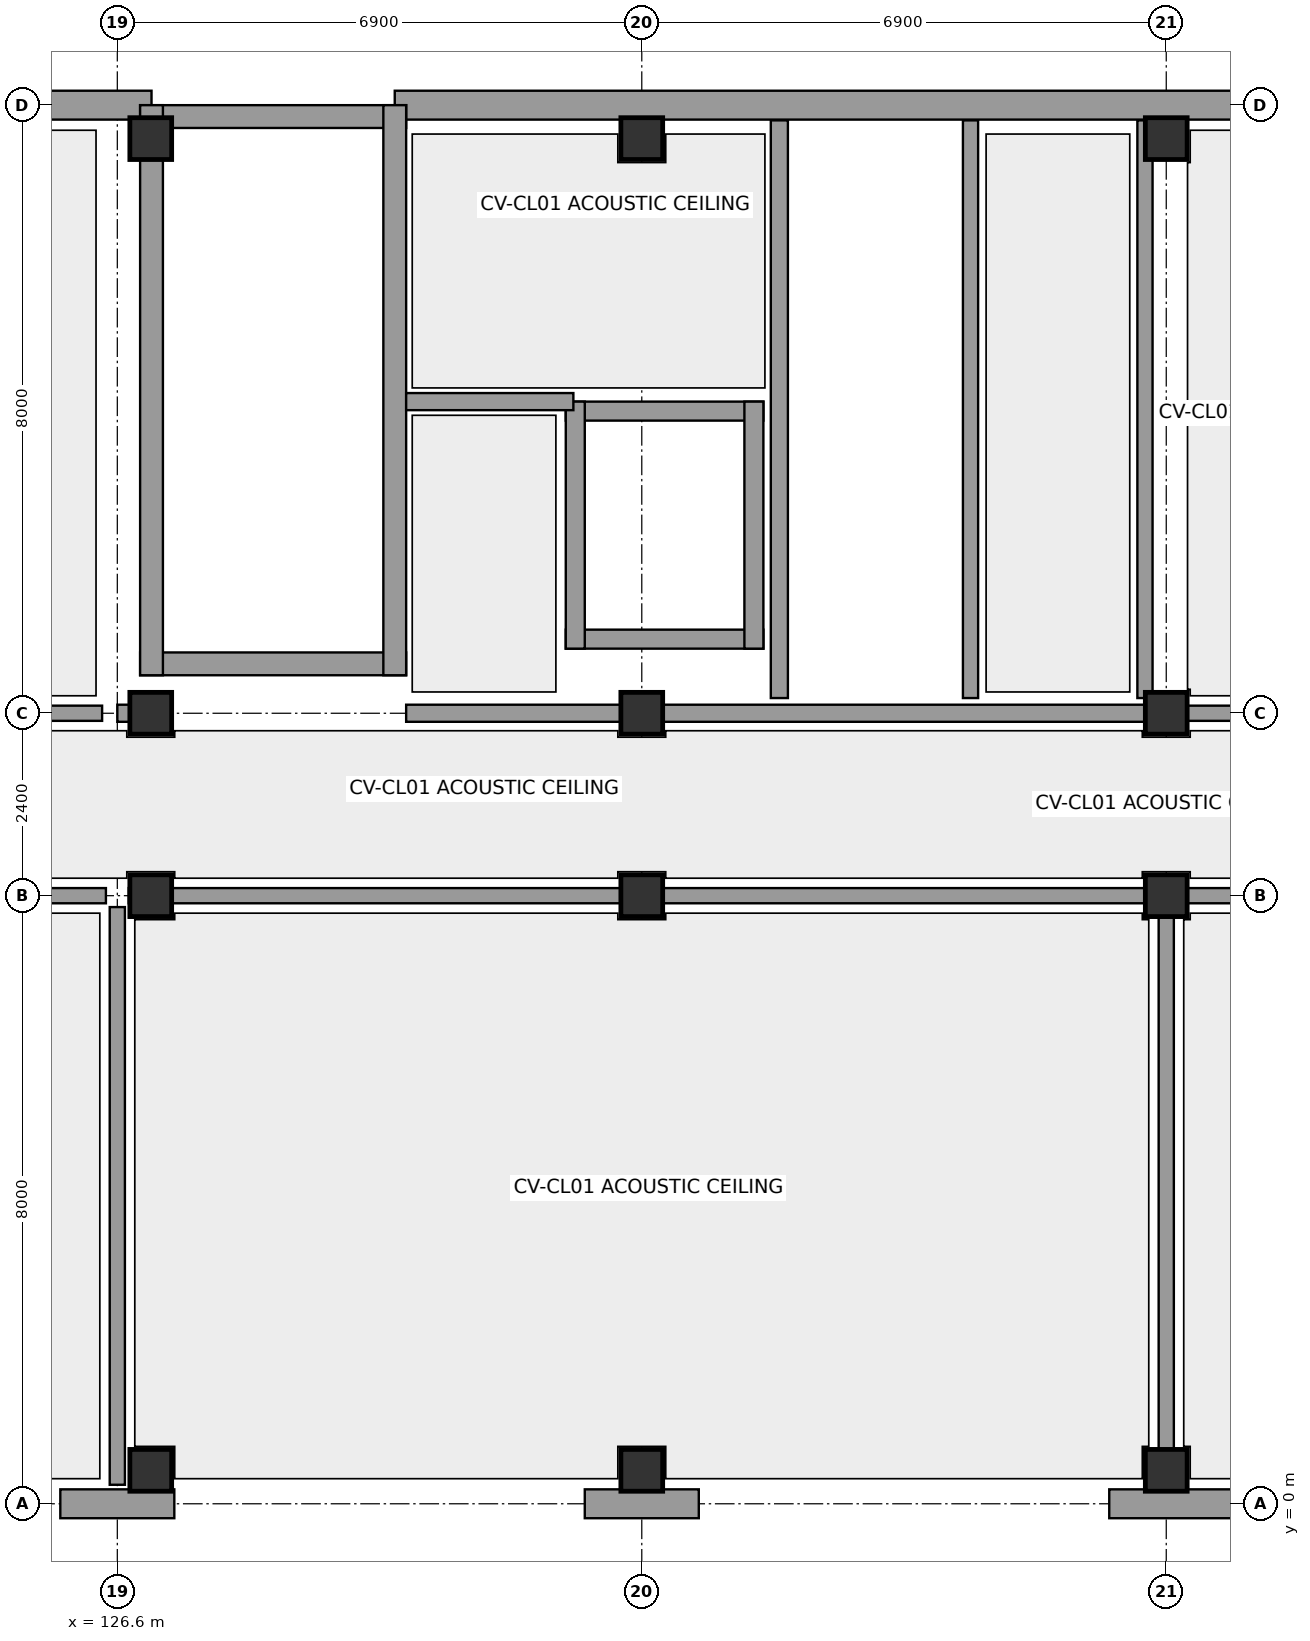
"""IFC4 building model, lengths in metres.
Left out: names, types, materials, properties, quantities, classifications, styles, units other than length and angle.
Written with IfcOpenShell. Run it as: python <this file> out.ifc"""

import sys

from ifc_helpers import new_model, si_unit, direction, frame, frame_2d, origin, origin_with_axes, origin_2d, place, context, subcontext, project, spatial, rectangle, extrude, element, fill, save


model = new_model("IFC4")
c1 = context("Model", 3, precision=1e-05, world=origin(), true_north=direction((0.0, 1.0)))
c2 = subcontext(c1, "Body", "Model", "MODEL_VIEW")
j1 = project(units=[si_unit("LENGTHUNIT", "METRE"), si_unit("PLANEANGLEUNIT", "RADIAN")], contexts=[c1])
p1 = place(None, origin())
s1 = spatial("IfcSite", under=j1, at=p1, CompositionType="ELEMENT")
p2 = place(p1, origin())
s2 = spatial("IfcBuilding", under=s1, at=p2, CompositionType="ELEMENT")
p3 = place(p2, origin())
s3 = spatial("IfcBuildingStorey", under=s2, at=p3, CompositionType="ELEMENT", Elevation=0.0)
for number, where, z_axis, x_axis in (
    (1, (127.04, 0.44, 0.0), (0.0, 0.0, 1.0), (1.0, 0.0, 0.0)),
    (2, (127.04, 8.0, 0.0), (0.0, 0.0, 1.0), (1.0, 0.0, 0.0)),
    (3, (127.04, 10.4, 0.0), (0.0, 0.0, 1.0), (1.0, 0.0, 0.0)),
    (4, (127.04, 17.96, 0.0), (0.0, 0.0, 1.0), (1.0, 0.0, 0.0)),
    (5, (133.5, 0.44, 0.0), (0.0, 0.0, 1.0), (1.0, 0.0, 0.0)),
    (6, (133.5, 8.0, 0.0), (0.0, 0.0, 1.0), (1.0, 0.0, 0.0)),
    (7, (133.5, 10.4, 0.0), (0.0, 0.0, 1.0), (1.0, 0.0, 0.0)),
    (8, (133.5, 17.96, 0.0), (0.0, 0.0, 1.0), (1.0, 0.0, 0.0)),
    (9, (140.4, 0.44, 0.0), (0.0, 0.0, 1.0), (1.0, 0.0, 0.0)),
    (10, (140.4, 8.0, 0.0), (0.0, 0.0, 1.0), (1.0, 0.0, 0.0)),
    (11, (140.4, 10.4, 0.0), (0.0, 0.0, 1.0), (1.0, 0.0, 0.0)),
    (12, (140.4, 17.96, 0.0), (0.0, 0.0, 1.0), (1.0, 0.0, 0.0)),
):
    element("IfcColumn", number, at=place(p3, frame(where, z_axis=z_axis, x_axis=x_axis)), inside=s3, PredefinedType="COLUMN", context=c2, shape_type="SweptSolid", body=[
        extrude(rectangle(XDim=0.55, YDim=0.55, at=origin_2d()), origin(), (0.0, 0.0, 1.0), 4.4),
    ])
for number, where, z_axis, x_axis in (
    (13, (125.85, 0.0, 0.0), (0.0, 0.0, 1.0), (1.0, 0.0, 0.0)),
    (14, (132.75, 0.0, 0.0), (0.0, 0.0, 1.0), (1.0, 0.0, 0.0)),
):
    element("IfcWall", number, at=place(p3, frame(where, z_axis=z_axis, x_axis=x_axis)), inside=s3, PredefinedType="STANDARD", context=c2, shape_type="SweptSolid", body=[
        extrude(rectangle(XDim=1.5, YDim=0.38, at=frame_2d((0.75, 0.0))), origin(), (0.0, 0.0, 1.0), 4.12),
    ])
p4 = place(p3, frame((139.65, 0.0, 0.0), z_axis=(0.0, 0.0, 1.0), x_axis=(1.0, 0.0, 0.0)))
e15 = element("IfcWall", 15, at=p4, inside=s3, PredefinedType="STANDARD", context=c2, shape_type="SweptSolid", body=[
    extrude(rectangle(XDim=4.05, YDim=0.38, at=frame_2d((2.025, 0.0))), origin(), (0.0, 0.0, 1.0), 4.12),
])
p5 = place(p4, frame((1.9, 0.0, 0.0)))
e16 = element("IfcOpeningElement", 16, at=p5, cuts=e15, PredefinedType="OPENING", context=c2, shape_type="SweptSolid", body=[
    extrude(rectangle(XDim=1.8, YDim=2.4, at=frame_2d((0.9, 1.2))), frame((0.0, 0.202, 0.0), z_axis=(0.0, -1.0, 0.0), x_axis=(1.0, 0.0, 0.0)), (0.0, 0.0, 1.0), 0.404),
])
p6 = place(p3, frame((125.65, 18.4, 0.0), z_axis=(0.0, 0.0, 1.0), x_axis=(1.0, 0.0, 0.0)))
e17 = element("IfcWall", 17, at=p6, inside=s3, PredefinedType="STANDARD", context=c2, shape_type="SweptSolid", body=[
    extrude(rectangle(XDim=1.4, YDim=0.38, at=frame_2d((0.7, 0.0))), origin(), (0.0, 0.0, 1.0), 4.12),
])
p7 = place(p3, frame((130.25, 18.4, 0.0), z_axis=(0.0, 0.0, 1.0), x_axis=(1.0, 0.0, 0.0)))
e18 = element("IfcWall", 18, at=p7, inside=s3, PredefinedType="STANDARD", context=c2, shape_type="SweptSolid", body=[
    extrude(rectangle(XDim=11.1, YDim=0.38, at=frame_2d((5.55, 0.0))), origin(), (0.0, 0.0, 1.0), 4.12),
])
p8 = place(p3, frame((126.9, 18.25, 0.0), z_axis=(0.0, 0.0, 1.0), x_axis=(1.0, 0.0, 0.0)))
e19 = element("IfcWall", 19, at=p8, inside=s3, PredefinedType="SHEAR", context=c2, shape_type="SweptSolid", body=[
    extrude(rectangle(XDim=3.5, YDim=0.3, at=frame_2d((1.75, 0.0))), origin(), (0.0, 0.0, 1.0), 4.12),
])
p9 = place(p8, frame((1.05, 0.0, 0.0)))
e20 = element("IfcOpeningElement", 20, at=p9, cuts=e19, PredefinedType="OPENING", context=c2, shape_type="SweptSolid", body=[
    extrude(rectangle(XDim=1.4, YDim=2.25, at=frame_2d((0.7, 1.125))), frame((0.0, 0.162, 0.0), z_axis=(0.0, -1.0, 0.0), x_axis=(1.0, 0.0, 0.0)), (0.0, 0.0, 1.0), 0.324),
])
p10 = place(p3, frame((126.9, 11.05, 0.0), z_axis=(0.0, 0.0, 1.0), x_axis=(1.0, 0.0, 0.0)))
e21 = element("IfcWall", 21, at=p10, inside=s3, PredefinedType="SHEAR", context=c2, shape_type="SweptSolid", body=[
    extrude(rectangle(XDim=3.5, YDim=0.3, at=frame_2d((1.75, 0.0))), origin(), (0.0, 0.0, 1.0), 4.12),
])
p11 = place(p3, frame((127.05, 10.9, 0.0), z_axis=(0.0, 0.0, 1.0), x_axis=(0.0, 1.0, 0.0)))
e22 = element("IfcWall", 22, at=p11, inside=s3, PredefinedType="SHEAR", context=c2, shape_type="SweptSolid", body=[
    extrude(rectangle(XDim=7.5, YDim=0.3, at=frame_2d((3.75, 0.0))), origin(), (0.0, 0.0, 1.0), 4.12),
])
p12 = place(p3, frame((130.25, 10.9, 0.0), z_axis=(0.0, 0.0, 1.0), x_axis=(0.0, 1.0, 0.0)))
e23 = element("IfcWall", 23, at=p12, inside=s3, PredefinedType="SHEAR", context=c2, shape_type="SweptSolid", body=[
    extrude(rectangle(XDim=7.5, YDim=0.3, at=frame_2d((3.75, 0.0))), origin(), (0.0, 0.0, 1.0), 4.12),
])
p13 = place(p12, frame((5.7, 0.0, 0.0)))
e24 = element("IfcOpeningElement", 24, at=p13, cuts=e23, PredefinedType="OPENING", context=c2, shape_type="SweptSolid", body=[
    extrude(rectangle(XDim=1.15, YDim=2.15, at=frame_2d((0.575, 1.075))), frame((0.0, 0.162, 0.0), z_axis=(0.0, -1.0, 0.0), x_axis=(1.0, 0.0, 0.0)), (0.0, 0.0, 1.0), 0.324),
])
p14 = place(p3, frame((132.5, 14.375, 0.0), z_axis=(0.0, 0.0, 1.0), x_axis=(1.0, 0.0, 0.0)))
e25 = element("IfcWall", 25, at=p14, inside=s3, PredefinedType="SHEAR", context=c2, shape_type="SweptSolid", body=[
    extrude(rectangle(XDim=2.6, YDim=0.25, at=frame_2d((1.3, 0.0))), origin(), (0.0, 0.0, 1.0), 4.12),
])
p15 = place(p14, frame((0.875, 0.0, 0.0)))
e26 = element("IfcOpeningElement", 26, at=p15, cuts=e25, PredefinedType="OPENING", context=c2, shape_type="SweptSolid", body=[
    extrude(rectangle(XDim=1.1, YDim=2.1, at=frame_2d((0.55, 1.05))), frame((0.0, 0.137, 0.0), z_axis=(0.0, -1.0, 0.0), x_axis=(1.0, 0.0, 0.0)), (0.0, 0.0, 1.0), 0.274),
])
p16 = place(p3, frame((132.5, 11.375, 0.0), z_axis=(0.0, 0.0, 1.0), x_axis=(1.0, 0.0, 0.0)))
e27 = element("IfcWall", 27, at=p16, inside=s3, PredefinedType="SHEAR", context=c2, shape_type="SweptSolid", body=[
    extrude(rectangle(XDim=2.6, YDim=0.25, at=frame_2d((1.3, 0.0))), origin(), (0.0, 0.0, 1.0), 4.12),
])
for number, where, z_axis, x_axis in (
    (28, (132.625, 11.25, 0.0), (0.0, 0.0, 1.0), (0.0, 1.0, 0.0)),
    (29, (134.975, 11.25, 0.0), (0.0, 0.0, 1.0), (0.0, 1.0, 0.0)),
):
    element("IfcWall", number, at=place(p3, frame(where, z_axis=z_axis, x_axis=x_axis)), inside=s3, PredefinedType="SHEAR", context=c2, shape_type="SweptSolid", body=[
        extrude(rectangle(XDim=3.25, YDim=0.25, at=frame_2d((1.625, 0.0))), origin(), (0.0, 0.0, 1.0), 4.12),
    ])
p17 = place(p3, frame((135.31, 10.6, 0.0), z_axis=(0.0, 0.0, 1.0), x_axis=(0.0, 1.0, 0.0)))
e30 = element("IfcWall", 30, at=p17, inside=s3, PredefinedType="PARTITIONING", context=c2, shape_type="SweptSolid", body=[
    extrude(rectangle(XDim=7.6, YDim=0.225, at=frame_2d((3.8, 0.0))), origin(), (0.0, 0.0, 1.0), 4.12),
])
p18 = place(p3, frame((130.4, 14.5, 0.0), z_axis=(0.0, 0.0, 1.0), x_axis=(1.0, 0.0, 0.0)))
e31 = element("IfcWall", 31, at=p18, inside=s3, PredefinedType="PARTITIONING", context=c2, shape_type="SweptSolid", body=[
    extrude(rectangle(XDim=2.2, YDim=0.225, at=frame_2d((1.1, 0.0))), origin(), (0.0, 0.0, 1.0), 4.12),
])
p19 = place(p18, frame((0.45, 0.0, 0.0)))
e32 = element("IfcOpeningElement", 32, at=p19, cuts=e31, PredefinedType="OPENING", context=c2, shape_type="SweptSolid", body=[
    extrude(rectangle(XDim=1.1, YDim=2.15, at=frame_2d((0.55, 1.075))), frame((0.0, 0.125, 0.0), z_axis=(0.0, -1.0, 0.0), x_axis=(1.0, 0.0, 0.0)), (0.0, 0.0, 1.0), 0.249),
])
p20 = place(p3, frame((126.6, 10.4, 0.0), z_axis=(0.0, 0.0, 1.0), x_axis=(1.0, 0.0, 0.0)))
e33 = element("IfcWall", 33, at=p20, inside=s3, PredefinedType="PARTITIONING", context=c2, shape_type="SweptSolid", body=[
    extrude(rectangle(XDim=0.3, YDim=0.225, at=frame_2d((0.15, 0.0))), origin(), (0.0, 0.0, 1.0), 4.12),
])
for number, where, z_axis, x_axis in (
    (34, (137.825, 10.6, 0.0), (0.0, 0.0, 1.0), (0.0, 1.0, 0.0)),
    (35, (140.12, 10.6, 0.0), (0.0, 0.0, 1.0), (0.0, 1.0, 0.0)),
):
    element("IfcWall", number, at=place(p3, frame(where, z_axis=z_axis, x_axis=x_axis)), inside=s3, PredefinedType="PARTITIONING", context=c2, shape_type="SweptSolid", body=[
        extrude(rectangle(XDim=7.6, YDim=0.2, at=frame_2d((3.8, 0.0))), origin(), (0.0, 0.0, 1.0), 4.12),
    ])
p21 = place(p3, frame((130.4, 10.4, 0.0), z_axis=(0.0, 0.0, 1.0), x_axis=(1.0, 0.0, 0.0)))
e36 = element("IfcWall", 36, at=p21, inside=s3, PredefinedType="PARTITIONING", context=c2, shape_type="SweptSolid", body=[
    extrude(rectangle(XDim=10.0, YDim=0.225, at=frame_2d((5.0, 0.0))), origin(), (0.0, 0.0, 1.0), 3.56),
])
p22 = place(p21, frame((0.475, 0.0, 0.0)))
e37 = element("IfcOpeningElement", 37, at=p22, cuts=e36, PredefinedType="OPENING", context=c2, shape_type="SweptSolid", body=[
    extrude(rectangle(XDim=1.1, YDim=2.15, at=frame_2d((0.55, 1.075))), frame((0.0, 0.125, 0.0), z_axis=(0.0, -1.0, 0.0), x_axis=(1.0, 0.0, 0.0)), (0.0, 0.0, 1.0), 0.249),
])
p23 = place(p21, frame((5.85, 0.0, 0.0)))
e38 = element("IfcOpeningElement", 38, at=p23, cuts=e36, PredefinedType="OPENING", context=c2, shape_type="SweptSolid", body=[
    extrude(rectangle(XDim=0.9, YDim=2.1, at=frame_2d((0.45, 1.05))), frame((0.0, 0.125, 0.0), z_axis=(0.0, -1.0, 0.0), x_axis=(1.0, 0.0, 0.0)), (0.0, 0.0, 1.0), 0.249),
])
p24 = place(p21, frame((7.9, 0.0, 0.0)))
e39 = element("IfcOpeningElement", 39, at=p24, cuts=e36, PredefinedType="OPENING", context=c2, shape_type="SweptSolid", body=[
    extrude(rectangle(XDim=0.95, YDim=2.15, at=frame_2d((0.475, 1.075))), frame((0.0, 0.125, 0.0), z_axis=(0.0, -1.0, 0.0), x_axis=(1.0, 0.0, 0.0)), (0.0, 0.0, 1.0), 0.249),
])
p25 = place(p3, frame((113.1, 8.0, 0.0), z_axis=(0.0, 0.0, 1.0), x_axis=(1.0, 0.0, 0.0)))
e40 = element("IfcWall", 40, at=p25, inside=s3, PredefinedType="PARTITIONING", context=c2, shape_type="SweptSolid", body=[
    extrude(rectangle(XDim=13.35, YDim=0.2, at=frame_2d((6.675, 0.0))), origin(), (0.0, 0.0, 1.0), 3.56),
])
p26 = place(p25, frame((2.0, 0.0, 0.0)))
e41 = element("IfcOpeningElement", 41, at=p26, cuts=e40, PredefinedType="OPENING", context=c2, shape_type="SweptSolid", body=[
    extrude(rectangle(XDim=1.0, YDim=2.15, at=frame_2d((0.5, 1.075))), frame((0.0, 0.112, 0.0), z_axis=(0.0, -1.0, 0.0), x_axis=(1.0, 0.0, 0.0)), (0.0, 0.0, 1.0), 0.224),
])
p27 = place(p3, frame((126.6, 0.25, 0.0), z_axis=(0.0, 0.0, 1.0), x_axis=(0.0, 1.0, 0.0)))
e42 = element("IfcWall", 42, at=p27, inside=s3, PredefinedType="PARTITIONING", context=c2, shape_type="SweptSolid", body=[
    extrude(rectangle(XDim=7.6, YDim=0.2, at=frame_2d((3.8, 0.0))), origin(), (0.0, 0.0, 1.0), 4.12),
])
p28 = place(p3, frame((126.75, 8.0, 0.0), z_axis=(0.0, 0.0, 1.0), x_axis=(1.0, 0.0, 0.0)))
e43 = element("IfcWall", 43, at=p28, inside=s3, PredefinedType="PARTITIONING", context=c2, shape_type="SweptSolid", body=[
    extrude(rectangle(XDim=13.5, YDim=0.2, at=frame_2d((6.75, 0.0))), origin(), (0.0, 0.0, 1.0), 3.56),
])
p29 = place(p28, frame((2.0, 0.0, 0.0)))
e44 = element("IfcOpeningElement", 44, at=p29, cuts=e43, PredefinedType="OPENING", context=c2, shape_type="SweptSolid", body=[
    extrude(rectangle(XDim=1.0, YDim=2.15, at=frame_2d((0.5, 1.075))), frame((0.0, 0.112, 0.0), z_axis=(0.0, -1.0, 0.0), x_axis=(1.0, 0.0, 0.0)), (0.0, 0.0, 1.0), 0.224),
])
p30 = place(p3, frame((140.4, 0.25, 0.0), z_axis=(0.0, 0.0, 1.0), x_axis=(0.0, 1.0, 0.0)))
e45 = element("IfcWall", 45, at=p30, inside=s3, PredefinedType="PARTITIONING", context=c2, shape_type="SweptSolid", body=[
    extrude(rectangle(XDim=7.6, YDim=0.2, at=frame_2d((3.8, 0.0))), origin(), (0.0, 0.0, 1.0), 4.12),
])
p31 = place(p3, frame((140.55, 8.0, 0.0), z_axis=(0.0, 0.0, 1.0), x_axis=(1.0, 0.0, 0.0)))
e46 = element("IfcWall", 46, at=p31, inside=s3, PredefinedType="PARTITIONING", context=c2, shape_type="SweptSolid", body=[
    extrude(rectangle(XDim=13.5, YDim=0.2, at=frame_2d((6.75, 0.0))), origin(), (0.0, 0.0, 1.0), 3.56),
])
p32 = place(p31, frame((2.0, 0.0, 0.0)))
e47 = element("IfcOpeningElement", 47, at=p32, cuts=e46, PredefinedType="OPENING", context=c2, shape_type="SweptSolid", body=[
    extrude(rectangle(XDim=1.0, YDim=2.15, at=frame_2d((0.5, 1.075))), frame((0.0, 0.112, 0.0), z_axis=(0.0, -1.0, 0.0), x_axis=(1.0, 0.0, 0.0)), (0.0, 0.0, 1.0), 0.224),
])
p33 = place(p3, frame((113.05, 10.4, 0.0), z_axis=(0.0, 0.0, 1.0), x_axis=(1.0, 0.0, 0.0)))
e48 = element("IfcWall", 48, at=p33, inside=s3, PredefinedType="PARTITIONING", context=c2, shape_type="SweptSolid", body=[
    extrude(rectangle(XDim=13.35, YDim=0.2, at=frame_2d((6.675, 0.0))), origin(), (0.0, 0.0, 1.0), 3.56),
])
p34 = place(p33, frame((1.9, 0.0, 0.0)))
e49 = element("IfcOpeningElement", 49, at=p34, cuts=e48, PredefinedType="OPENING", context=c2, shape_type="SweptSolid", body=[
    extrude(rectangle(XDim=0.95, YDim=2.15, at=frame_2d((0.475, 1.075))), frame((0.0, 0.112, 0.0), z_axis=(0.0, -1.0, 0.0), x_axis=(1.0, 0.0, 0.0)), (0.0, 0.0, 1.0), 0.224),
])
p35 = place(p3, frame((140.6, 10.4, 0.0), z_axis=(0.0, 0.0, 1.0), x_axis=(1.0, 0.0, 0.0)))
e50 = element("IfcWall", 50, at=p35, inside=s3, PredefinedType="PARTITIONING", context=c2, shape_type="SweptSolid", body=[
    extrude(rectangle(XDim=6.5, YDim=0.2, at=frame_2d((3.25, 0.0))), origin(), (0.0, 0.0, 1.0), 3.56),
])
p36 = place(p35, frame((1.9, 0.0, 0.0)))
e51 = element("IfcOpeningElement", 51, at=p36, cuts=e50, PredefinedType="OPENING", context=c2, shape_type="SweptSolid", body=[
    extrude(rectangle(XDim=0.95, YDim=2.15, at=frame_2d((0.475, 1.075))), frame((0.0, 0.112, 0.0), z_axis=(0.0, -1.0, 0.0), x_axis=(1.0, 0.0, 0.0)), (0.0, 0.0, 1.0), 0.224),
])
p37 = place(p9, origin_with_axes())
e52 = element("IfcDoor", 52, at=p37, inside=s3, OperationType="DOUBLE_DOOR_SINGLE_SWING", PredefinedType="DOOR", context=c2, shape_type="SweptSolid", body=[
    extrude(rectangle(XDim=1.4, YDim=2.25, at=frame_2d((0.7, 1.125))), frame((0.0, 0.025, 0.0), z_axis=(0.0, -1.0, 0.0), x_axis=(1.0, 0.0, 0.0)), (0.0, 0.0, 1.0), 0.05),
])
fill(e20, e52)
p38 = place(p13, origin_with_axes())
e53 = element("IfcDoor", 53, at=p38, inside=s3, OperationType="SINGLE_SWING_LEFT", PredefinedType="DOOR", context=c2, shape_type="SweptSolid", body=[
    extrude(rectangle(XDim=1.15, YDim=2.15, at=frame_2d((0.575, 1.075))), frame((0.0, 0.025, 0.0), z_axis=(0.0, -1.0, 0.0), x_axis=(1.0, 0.0, 0.0)), (0.0, 0.0, 1.0), 0.05),
])
fill(e24, e53)
p39 = place(p15, origin_with_axes())
e54 = element("IfcDoor", 54, at=p39, inside=s3, OperationType="SLIDING_TO_LEFT", PredefinedType="DOOR", context=c2, shape_type="SweptSolid", body=[
    extrude(rectangle(XDim=1.1, YDim=2.1, at=frame_2d((0.55, 1.05))), frame((0.0, 0.025, 0.0), z_axis=(0.0, -1.0, 0.0), x_axis=(1.0, 0.0, 0.0)), (0.0, 0.0, 1.0), 0.05),
])
fill(e26, e54)
p40 = place(p19, origin_with_axes())
e55 = element("IfcDoor", 55, at=p40, inside=s3, OperationType="SINGLE_SWING_RIGHT", PredefinedType="DOOR", context=c2, shape_type="SweptSolid", body=[
    extrude(rectangle(XDim=1.1, YDim=2.15, at=frame_2d((0.55, 1.075))), frame((0.0, 0.025, 0.0), z_axis=(0.0, -1.0, 0.0), x_axis=(1.0, 0.0, 0.0)), (0.0, 0.0, 1.0), 0.05),
])
fill(e32, e55)
p41 = place(p22, origin_with_axes())
e56 = element("IfcDoor", 56, at=p41, inside=s3, OperationType="SINGLE_SWING_LEFT", PredefinedType="DOOR", context=c2, shape_type="SweptSolid", body=[
    extrude(rectangle(XDim=1.1, YDim=2.15, at=frame_2d((0.55, 1.075))), frame((0.0, 0.025, 0.0), z_axis=(0.0, -1.0, 0.0), x_axis=(1.0, 0.0, 0.0)), (0.0, 0.0, 1.0), 0.05),
])
fill(e37, e56)
p42 = place(p23, frame((0.9, 0.0, 0.0), z_axis=(0.0, 0.0, 1.0), x_axis=(-1.0, 0.0, 0.0)))
e57 = element("IfcDoor", 57, at=p42, inside=s3, OperationType="SINGLE_SWING_LEFT", PredefinedType="DOOR", context=c2, shape_type="SweptSolid", body=[
    extrude(rectangle(XDim=0.9, YDim=2.1, at=frame_2d((0.45, 1.05))), frame((0.0, 0.025, 0.0), z_axis=(0.0, -1.0, 0.0), x_axis=(1.0, 0.0, 0.0)), (0.0, 0.0, 1.0), 0.05),
])
fill(e38, e57)
p43 = place(p24, frame((0.95, 0.0, 0.0), z_axis=(0.0, 0.0, 1.0), x_axis=(-1.0, 0.0, 0.0)))
e58 = element("IfcDoor", 58, at=p43, inside=s3, OperationType="SINGLE_SWING_RIGHT", PredefinedType="DOOR", context=c2, shape_type="SweptSolid", body=[
    extrude(rectangle(XDim=0.95, YDim=2.15, at=frame_2d((0.475, 1.075))), frame((0.0, 0.025, 0.0), z_axis=(0.0, -1.0, 0.0), x_axis=(1.0, 0.0, 0.0)), (0.0, 0.0, 1.0), 0.05),
])
fill(e39, e58)
p44 = place(p29, origin_with_axes())
e59 = element("IfcDoor", 59, at=p44, inside=s3, OperationType="SINGLE_SWING_RIGHT", PredefinedType="DOOR", context=c2, shape_type="SweptSolid", body=[
    extrude(rectangle(XDim=1.0, YDim=2.15, at=frame_2d((0.5, 1.075))), frame((0.0, 0.025, 0.0), z_axis=(0.0, -1.0, 0.0), x_axis=(1.0, 0.0, 0.0)), (0.0, 0.0, 1.0), 0.05),
])
fill(e44, e59)
save(model, sys.argv[1])
